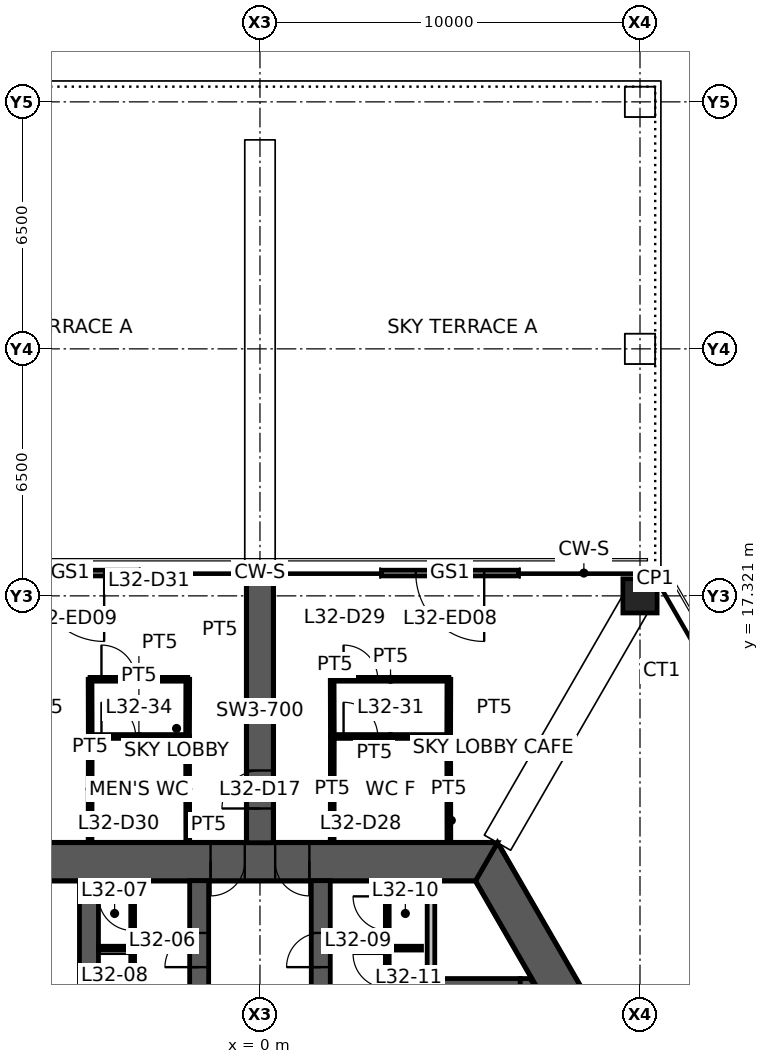
"""IFC4 building model, lengths in metres.
Left out: names, types, materials, properties, quantities, classifications, styles, units other than length and angle.
Written with IfcOpenShell. Run it as: python <this file> out.ifc"""

import sys

from ifc_helpers import new_model, si_unit, direction, frame, frame_2d, origin, origin_2d, place, context, subcontext, project, spatial, polyline, rectangle, hollow_rectangle, outline, extrude, element, fill, save


model = new_model("IFC4")
c1 = context("Model", 3, precision=1e-05, world=origin(), true_north=direction((0.0, 1.0)))
c2 = subcontext(c1, "Body", "Model", "MODEL_VIEW")
j1 = project(units=[si_unit("LENGTHUNIT", "METRE"), si_unit("PLANEANGLEUNIT", "RADIAN")], contexts=[c1])
p1 = place(None, origin())
s1 = spatial("IfcSite", under=j1, at=p1, CompositionType="ELEMENT")
p2 = place(p1, origin())
s2 = spatial("IfcBuilding", under=s1, at=p2, CompositionType="ELEMENT")
p3 = place(p2, frame((0.0, 0.0, 128.6)))
s3 = spatial("IfcBuildingStorey", under=s2, at=p3, CompositionType="ELEMENT", Elevation=128.6)
p4 = place(p3, frame((10.0, 17.321, 0.0), z_axis=(0.0, 0.0, 1.0), x_axis=(1.0, 0.0, 0.0)))
e1 = element("IfcColumn", 1, at=p4, inside=s3, PredefinedType="COLUMN", context=c2, shape_type="SweptSolid", body=[
    extrude(hollow_rectangle(XDim=0.9, YDim=0.9, WallThickness=0.07, at=origin_2d()), origin(), (0.0, 0.0, 1.0), 4.5),
])
p5 = place(p3, frame((11.922, 0.0, 0.0), z_axis=(0.0, 0.0, 1.0), x_axis=(-0.500004296715, 0.866022923061, 0.0)))
e2 = element("IfcWall", 2, at=p5, inside=s3, PredefinedType="SHEAR", context=c2, shape_type="SweptSolid", body=[
    extrude(outline(polyline([(-0.289, -0.5), (5.835, -0.5), (6.635, -0.5), (12.211, -0.5), (11.634, 0.5), (6.635, 0.5), (5.835, 0.5), (0.289, 0.5), (-0.289, -0.5)])), origin(), (0.0, 0.0, 1.0), 4.5),
])
p6 = place(p5, frame((5.835, 0.0, 0.0)))
e3 = element("IfcOpeningElement", 3, at=p6, cuts=e2, PredefinedType="OPENING", context=c2, shape_type="SweptSolid", body=[
    extrude(rectangle(XDim=0.8, YDim=2.1, at=frame_2d((0.4, 1.05))), frame((0.0, 0.51, 0.0), z_axis=(0.0, -1.0, 0.0), x_axis=(1.0, 0.0, 0.0)), (0.0, 0.0, 1.0), 1.02),
])
p7 = place(p3, frame((5.961, 10.325, 0.0), z_axis=(0.0, 0.0, 1.0), x_axis=(-1.0, 0.0, 0.0)))
e4 = element("IfcWall", 4, at=p7, inside=s3, PredefinedType="SHEAR", context=c2, shape_type="SweptSolid", body=[
    extrude(outline(polyline([(-0.289, -0.5), (4.661, -0.5), (5.561, -0.5), (6.361, -0.5), (7.261, -0.5), (12.211, -0.5), (11.634, 0.5), (7.261, 0.5), (6.361, 0.5), (5.561, 0.5), (4.661, 0.5), (0.289, 0.5), (-0.289, -0.5)])), origin(), (0.0, 0.0, 1.0), 4.5),
])
p8 = place(p7, frame((6.361, 0.0, 0.0)))
e5 = element("IfcOpeningElement", 5, at=p8, cuts=e4, PredefinedType="OPENING", context=c2, shape_type="SweptSolid", body=[
    extrude(rectangle(XDim=0.9, YDim=2.1, at=frame_2d((0.45, 1.05))), frame((0.0, 0.51, 0.0), z_axis=(0.0, -1.0, 0.0), x_axis=(1.0, 0.0, 0.0)), (0.0, 0.0, 1.0), 1.02),
])
p9 = place(p7, frame((4.661, 0.0, 0.0)))
e6 = element("IfcOpeningElement", 6, at=p9, cuts=e4, PredefinedType="OPENING", context=c2, shape_type="SweptSolid", body=[
    extrude(rectangle(XDim=0.9, YDim=2.1, at=frame_2d((0.45, 1.05))), frame((0.0, 0.51, 0.0), z_axis=(0.0, -1.0, 0.0), x_axis=(1.0, 0.0, 0.0)), (0.0, 0.0, 1.0), 1.02),
])
p10 = place(p3, frame((0.0, 10.825, 0.0), z_axis=(0.0, 0.0, 1.0), x_axis=(0.0, 1.0, 0.0)))
e7 = element("IfcWall", 7, at=p10, inside=s3, PredefinedType="SHEAR", context=c2, shape_type="SweptSolid", body=[
    extrude(rectangle(XDim=6.946, YDim=0.7, at=frame_2d((3.473, 0.0))), origin(), (0.0, 0.0, 1.0), 4.5),
])
p11 = place(p10, frame((0.9, 0.0, 0.0)))
e8 = element("IfcOpeningElement", 8, at=p11, cuts=e7, PredefinedType="OPENING", context=c2, shape_type="SweptSolid", body=[
    extrude(rectangle(XDim=1.0, YDim=2.1, at=frame_2d((0.5, 1.05))), frame((0.0, 0.36, 0.0), z_axis=(0.0, -1.0, 0.0), x_axis=(1.0, 0.0, 0.0)), (0.0, 0.0, 1.0), 0.72),
])
p12 = place(p3, frame((6.8, 17.92, 0.0), z_axis=(0.0, 0.0, 1.0), x_axis=(-1.0, 0.0, 0.0)))
e9 = element("IfcWall", 9, at=p12, inside=s3, PredefinedType="STANDARD", context=c2, shape_type="SweptSolid", body=[
    extrude(rectangle(XDim=3.6, YDim=0.15, at=frame_2d((1.8, 0.0))), origin(), (0.0, 0.0, 1.0), 4.5),
])
p13 = place(p12, frame((0.9, 0.0, 0.0)))
e10 = element("IfcOpeningElement", 10, at=p13, cuts=e9, PredefinedType="OPENING", context=c2, shape_type="SweptSolid", body=[
    extrude(rectangle(XDim=1.8, YDim=2.1, at=frame_2d((0.9, 1.05))), frame((0.0, 0.085, 0.0), z_axis=(0.0, -1.0, 0.0), x_axis=(1.0, 0.0, 0.0)), (0.0, 0.0, 1.0), 0.17),
])
p14 = place(p3, frame((-3.2, 17.92, 0.0), z_axis=(0.0, 0.0, 1.0), x_axis=(-1.0, 0.0, 0.0)))
e11 = element("IfcWall", 11, at=p14, inside=s3, PredefinedType="STANDARD", context=c2, shape_type="SweptSolid", body=[
    extrude(rectangle(XDim=3.6, YDim=0.15, at=frame_2d((1.8, 0.0))), origin(), (0.0, 0.0, 1.0), 4.5),
])
p15 = place(p14, frame((0.9, 0.0, 0.0)))
e12 = element("IfcOpeningElement", 12, at=p15, cuts=e11, PredefinedType="OPENING", context=c2, shape_type="SweptSolid", body=[
    extrude(rectangle(XDim=1.8, YDim=2.1, at=frame_2d((0.9, 1.05))), frame((0.0, 0.085, 0.0), z_axis=(0.0, -1.0, 0.0), x_axis=(1.0, 0.0, 0.0)), (0.0, 0.0, 1.0), 0.17),
])
p16 = place(p3, frame((-1.6, 3.85, 0.0), z_axis=(0.0, 0.0, 1.0), x_axis=(0.0, 1.0, 0.0)))
e13 = element("IfcWall", 13, at=p16, inside=s3, PredefinedType="SHEAR", context=c2, shape_type="SweptSolid", body=[
    extrude(rectangle(XDim=5.975, YDim=0.5, at=frame_2d((2.987, 0.0))), origin(), (0.0, 0.0, 1.0), 4.5),
])
p17 = place(p16, frame((3.7, 0.0, 0.0)))
e14 = element("IfcOpeningElement", 14, at=p17, cuts=e13, PredefinedType="OPENING", context=c2, shape_type="SweptSolid", body=[
    extrude(rectangle(XDim=0.9, YDim=2.1, at=frame_2d((0.45, 1.05))), frame((0.0, 0.26, 0.0), z_axis=(0.0, -1.0, 0.0), x_axis=(1.0, 0.0, 0.0)), (0.0, 0.0, 1.0), 0.52),
])
p18 = place(p3, frame((1.6, 3.85, 0.0), z_axis=(0.0, 0.0, 1.0), x_axis=(0.0, 1.0, 0.0)))
e15 = element("IfcWall", 15, at=p18, inside=s3, PredefinedType="SHEAR", context=c2, shape_type="SweptSolid", body=[
    extrude(rectangle(XDim=5.975, YDim=0.5, at=frame_2d((2.987, 0.0))), origin(), (0.0, 0.0, 1.0), 4.5),
])
p19 = place(p18, frame((3.7, 0.0, 0.0)))
e16 = element("IfcOpeningElement", 16, at=p19, cuts=e15, PredefinedType="OPENING", context=c2, shape_type="SweptSolid", body=[
    extrude(rectangle(XDim=0.9, YDim=2.1, at=frame_2d((0.45, 1.05))), frame((0.0, 0.26, 0.0), z_axis=(0.0, -1.0, 0.0), x_axis=(1.0, 0.0, 0.0)), (0.0, 0.0, 1.0), 0.52),
])
p20 = place(p3, frame((-4.5, 3.85, 0.0), z_axis=(0.0, 0.0, 1.0), x_axis=(0.0, 1.0, 0.0)))
e17 = element("IfcWall", 17, at=p20, inside=s3, PredefinedType="SHEAR", context=c2, shape_type="SweptSolid", body=[
    extrude(rectangle(XDim=5.975, YDim=0.5, at=frame_2d((2.987, 0.0))), origin(), (0.0, 0.0, 1.0), 4.5),
])
p21 = place(p3, frame((4.5, 3.85, 0.0), z_axis=(0.0, 0.0, 1.0), x_axis=(0.0, 1.0, 0.0)))
e18 = element("IfcWall", 18, at=p21, inside=s3, PredefinedType="SHEAR", context=c2, shape_type="SweptSolid", body=[
    extrude(rectangle(XDim=3.4, YDim=0.5, at=frame_2d((1.7, 0.0))), origin(), (0.0, 0.0, 1.0), 4.5),
])
p22 = place(p3, frame((4.75, 7.0, 0.0), z_axis=(0.0, 0.0, 1.0), x_axis=(1.0, 0.0, 0.0)))
e19 = element("IfcWall", 19, at=p22, inside=s3, PredefinedType="SHEAR", context=c2, shape_type="SweptSolid", body=[
    extrude(rectangle(XDim=2.1, YDim=0.5, at=frame_2d((1.05, 0.0))), origin(), (0.0, 0.0, 1.0), 4.5),
])
p23 = place(p3, frame((7.1, 3.85, 0.0), z_axis=(0.0, 0.0, 1.0), x_axis=(0.0, 1.0, 0.0)))
e20 = element("IfcWall", 20, at=p23, inside=s3, PredefinedType="SHEAR", context=c2, shape_type="SweptSolid", body=[
    extrude(outline(polyline([(0.0, -0.25), (3.069, -0.25), (3.4, 0.0), (3.4, 0.25), (0.0, 0.25), (0.0, -0.25)])), origin(), (0.0, 0.0, 1.0), 4.5),
])
p24 = place(p3, frame((4.5, 7.25, 0.0), z_axis=(0.0, 0.0, 1.0), x_axis=(0.0, 1.0, 0.0)))
e21 = element("IfcWall", 21, at=p24, inside=s3, PredefinedType="STANDARD", context=c2, shape_type="SweptSolid", body=[
    extrude(rectangle(XDim=2.575, YDim=0.2, at=frame_2d((1.288, 0.0))), origin(), (0.0, 0.0, 1.0), 4.5),
])
p25 = place(p3, frame((-3.35, 6.65, 0.0), z_axis=(0.0, 0.0, 1.0), x_axis=(0.0, 1.0, 0.0)))
e22 = element("IfcWall", 22, at=p25, inside=s3, PredefinedType="PARTITIONING", context=c2, shape_type="SweptSolid", body=[
    extrude(rectangle(XDim=3.175, YDim=0.1, at=frame_2d((1.587, 0.0))), origin(), (0.0, 0.0, 1.0), 3.55),
])
p26 = place(p25, frame((1.863, 0.0, 0.0)))
e23 = element("IfcOpeningElement", 23, at=p26, cuts=e22, PredefinedType="OPENING", context=c2, shape_type="SweptSolid", body=[
    extrude(rectangle(XDim=0.9, YDim=2.1, at=frame_2d((0.45, 1.05))), frame((0.0, 0.06, 0.0), z_axis=(0.0, -1.0, 0.0), x_axis=(1.0, 0.0, 0.0)), (0.0, 0.0, 1.0), 0.12),
])
p27 = place(p25, frame((0.35, 0.0, 0.0)))
e24 = element("IfcOpeningElement", 24, at=p27, cuts=e22, PredefinedType="OPENING", context=c2, shape_type="SweptSolid", body=[
    extrude(rectangle(XDim=0.9, YDim=2.1, at=frame_2d((0.45, 1.05))), frame((0.0, 0.06, 0.0), z_axis=(0.0, -1.0, 0.0), x_axis=(1.0, 0.0, 0.0)), (0.0, 0.0, 1.0), 0.12),
])
p28 = place(p3, frame((-3.4, 8.05, 0.0), z_axis=(0.0, 0.0, 1.0), x_axis=(-1.0, 0.0, 0.0)))
e25 = element("IfcWall", 25, at=p28, inside=s3, PredefinedType="PARTITIONING", context=c2, shape_type="SweptSolid", body=[
    extrude(rectangle(XDim=0.85, YDim=0.1, at=frame_2d((0.425, 0.0))), origin(), (0.0, 0.0, 1.0), 3.55),
])
p29 = place(p3, frame((3.35, 6.65, 0.0), z_axis=(0.0, 0.0, 1.0), x_axis=(0.0, 1.0, 0.0)))
e26 = element("IfcWall", 26, at=p29, inside=s3, PredefinedType="PARTITIONING", context=c2, shape_type="SweptSolid", body=[
    extrude(rectangle(XDim=3.175, YDim=0.1, at=frame_2d((1.587, 0.0))), origin(), (0.0, 0.0, 1.0), 3.55),
])
p30 = place(p29, frame((1.863, 0.0, 0.0)))
e27 = element("IfcOpeningElement", 27, at=p30, cuts=e26, PredefinedType="OPENING", context=c2, shape_type="SweptSolid", body=[
    extrude(rectangle(XDim=0.9, YDim=2.1, at=frame_2d((0.45, 1.05))), frame((0.0, 0.06, 0.0), z_axis=(0.0, -1.0, 0.0), x_axis=(1.0, 0.0, 0.0)), (0.0, 0.0, 1.0), 0.12),
])
p31 = place(p29, frame((0.35, 0.0, 0.0)))
e28 = element("IfcOpeningElement", 28, at=p31, cuts=e26, PredefinedType="OPENING", context=c2, shape_type="SweptSolid", body=[
    extrude(rectangle(XDim=0.9, YDim=2.1, at=frame_2d((0.45, 1.05))), frame((0.0, 0.06, 0.0), z_axis=(0.0, -1.0, 0.0), x_axis=(1.0, 0.0, 0.0)), (0.0, 0.0, 1.0), 0.12),
])
p32 = place(p3, frame((3.4, 8.05, 0.0), z_axis=(0.0, 0.0, 1.0), x_axis=(1.0, 0.0, 0.0)))
e29 = element("IfcWall", 29, at=p32, inside=s3, PredefinedType="PARTITIONING", context=c2, shape_type="SweptSolid", body=[
    extrude(rectangle(XDim=0.85, YDim=0.1, at=frame_2d((0.425, 0.0))), origin(), (0.0, 0.0, 1.0), 3.55),
])
p33 = place(p3, frame((1.9, 13.62, 0.0), z_axis=(0.0, 0.0, 1.0), x_axis=(1.0, 0.0, 0.0)))
e30 = element("IfcWall", 30, at=p33, inside=s3, PredefinedType="PARTITIONING", context=c2, shape_type="SweptSolid", body=[
    extrude(rectangle(XDim=3.071, YDim=0.1, at=frame_2d((1.536, 0.0))), origin(), (0.0, 0.0, 1.0), 3.55),
])
p34 = place(p33, frame((0.3, 0.0, 0.0)))
e31 = element("IfcOpeningElement", 31, at=p34, cuts=e30, PredefinedType="OPENING", context=c2, shape_type="SweptSolid", body=[
    extrude(rectangle(XDim=0.9, YDim=2.1, at=frame_2d((0.45, 1.05))), frame((0.0, 0.06, 0.0), z_axis=(0.0, -1.0, 0.0), x_axis=(1.0, 0.0, 0.0)), (0.0, 0.0, 1.0), 0.12),
])
for number, where, z_axis, x_axis in (
    (32, (1.9, 10.845, 0.0), (0.0, 0.0, 1.0), (0.002, 1.0, 0.0)),
    (33, (4.966, 13.625, 0.0), (0.0, 0.0, 1.0), (0.002, -1.0, 0.0)),
):
    element("IfcWall", number, at=place(p3, frame(where, z_axis=z_axis, x_axis=x_axis)), inside=s3, PredefinedType="PARTITIONING", context=c2, shape_type="SweptSolid", body=[
        extrude(rectangle(XDim=2.78, YDim=0.1, at=frame_2d((1.39, 0.0))), origin(), (0.0, 0.0, 1.0), 3.55),
    ])
p35 = place(p3, frame((1.9, 15.125, 0.0), z_axis=(0.0, 0.0, 1.0), x_axis=(1.0, 0.0, 0.0)))
e34 = element("IfcWall", 34, at=p35, inside=s3, PredefinedType="PARTITIONING", context=c2, shape_type="SweptSolid", body=[
    extrude(rectangle(XDim=3.071, YDim=0.1, at=frame_2d((1.536, 0.0))), origin(), (0.0, 0.0, 1.0), 3.55),
])
p36 = place(p35, frame((0.3, 0.0, 0.0)))
e35 = element("IfcOpeningElement", 35, at=p36, cuts=e34, PredefinedType="OPENING", context=c2, shape_type="SweptSolid", body=[
    extrude(rectangle(XDim=0.9, YDim=2.1, at=frame_2d((0.45, 1.05))), frame((0.0, 0.06, 0.0), z_axis=(0.0, -1.0, 0.0), x_axis=(1.0, 0.0, 0.0)), (0.0, 0.0, 1.0), 0.12),
])
for number, where, z_axis, x_axis in (
    (36, (1.905, 13.625, 0.0), (0.0, 0.0, 1.0), (-0.003, 1.0, 0.0)),
    (37, (4.971, 15.125, 0.0), (0.0, 0.0, 1.0), (-0.003, -1.0, 0.0)),
):
    element("IfcWall", number, at=place(p3, frame(where, z_axis=z_axis, x_axis=x_axis)), inside=s3, PredefinedType="PARTITIONING", context=c2, shape_type="SweptSolid", body=[
        extrude(rectangle(XDim=1.5, YDim=0.1, at=frame_2d((0.75, 0.0))), origin(), (0.0, 0.0, 1.0), 3.55),
    ])
p37 = place(p3, frame((-4.471, 13.62, 0.0), z_axis=(0.0, 0.0, 1.0), x_axis=(1.0, 0.0, 0.0)))
e38 = element("IfcWall", 38, at=p37, inside=s3, PredefinedType="PARTITIONING", context=c2, shape_type="SweptSolid", body=[
    extrude(rectangle(XDim=2.571, YDim=0.1, at=frame_2d((1.286, 0.0))), origin(), (0.0, 0.0, 1.0), 3.55),
])
p38 = place(p37, frame((0.3, 0.0, 0.0)))
e39 = element("IfcOpeningElement", 39, at=p38, cuts=e38, PredefinedType="OPENING", context=c2, shape_type="SweptSolid", body=[
    extrude(rectangle(XDim=0.9, YDim=2.1, at=frame_2d((0.45, 1.05))), frame((0.0, 0.06, 0.0), z_axis=(0.0, -1.0, 0.0), x_axis=(1.0, 0.0, 0.0)), (0.0, 0.0, 1.0), 0.12),
])
for number, where, z_axis, x_axis in (
    (40, (-4.471, 10.845, 0.0), (0.0, 0.0, 1.0), (0.002, 1.0, 0.0)),
    (41, (-1.905, 13.625, 0.0), (0.0, 0.0, 1.0), (0.002, -1.0, 0.0)),
):
    element("IfcWall", number, at=place(p3, frame(where, z_axis=z_axis, x_axis=x_axis)), inside=s3, PredefinedType="PARTITIONING", context=c2, shape_type="SweptSolid", body=[
        extrude(rectangle(XDim=2.78, YDim=0.1, at=frame_2d((1.39, 0.0))), origin(), (0.0, 0.0, 1.0), 3.55),
    ])
p39 = place(p3, frame((-4.471, 15.125, 0.0), z_axis=(0.0, 0.0, 1.0), x_axis=(1.0, 0.0, 0.0)))
e42 = element("IfcWall", 42, at=p39, inside=s3, PredefinedType="PARTITIONING", context=c2, shape_type="SweptSolid", body=[
    extrude(rectangle(XDim=2.571, YDim=0.1, at=frame_2d((1.286, 0.0))), origin(), (0.0, 0.0, 1.0), 3.55),
])
p40 = place(p39, frame((0.3, 0.0, 0.0)))
e43 = element("IfcOpeningElement", 43, at=p40, cuts=e42, PredefinedType="OPENING", context=c2, shape_type="SweptSolid", body=[
    extrude(rectangle(XDim=0.9, YDim=2.1, at=frame_2d((0.45, 1.05))), frame((0.0, 0.06, 0.0), z_axis=(0.0, -1.0, 0.0), x_axis=(1.0, 0.0, 0.0)), (0.0, 0.0, 1.0), 0.12),
])
for number, where, z_axis, x_axis in (
    (44, (-4.466, 13.625, 0.0), (0.0, 0.0, 1.0), (-0.003, 1.0, 0.0)),
    (45, (-1.9, 15.125, 0.0), (0.0, 0.0, 1.0), (-0.003, -1.0, 0.0)),
):
    element("IfcWall", number, at=place(p3, frame(where, z_axis=z_axis, x_axis=x_axis)), inside=s3, PredefinedType="PARTITIONING", context=c2, shape_type="SweptSolid", body=[
        extrude(rectangle(XDim=1.5, YDim=0.1, at=frame_2d((0.75, 0.0))), origin(), (0.0, 0.0, 1.0), 3.55),
    ])
p41 = place(p3, frame((0.0, 17.771, 0.0), z_axis=(0.0, 0.0, 1.0), x_axis=(0.0, 1.0, 0.0)))
e46 = element("IfcWall", 46, at=p41, inside=s3, PredefinedType="PARTITIONING", context=c2, shape_type="SweptSolid", body=[
    extrude(rectangle(XDim=0.045, YDim=0.175, at=frame_2d((0.022, 0.0))), origin(), (0.0, 0.0, 1.0), 4.5),
])
p42 = place(p13, origin())
e47 = element("IfcDoor", 47, at=p42, inside=s3, OperationType="DOUBLE_DOOR_SINGLE_SWING", PredefinedType="DOOR", context=c2, shape_type="SweptSolid", body=[
    extrude(rectangle(XDim=1.8, YDim=2.1, at=frame_2d((0.9, 1.05))), frame((0.0, 0.025, 0.0), z_axis=(0.0, -1.0, 0.0), x_axis=(1.0, 0.0, 0.0)), (0.0, 0.0, 1.0), 0.05),
])
fill(e10, e47)
p43 = place(p15, origin())
e48 = element("IfcDoor", 48, at=p43, inside=s3, OperationType="DOUBLE_DOOR_SINGLE_SWING", PredefinedType="DOOR", context=c2, shape_type="SweptSolid", body=[
    extrude(rectangle(XDim=1.8, YDim=2.1, at=frame_2d((0.9, 1.05))), frame((0.0, 0.025, 0.0), z_axis=(0.0, -1.0, 0.0), x_axis=(1.0, 0.0, 0.0)), (0.0, 0.0, 1.0), 0.05),
])
fill(e12, e48)
p44 = place(p8, origin())
e49 = element("IfcDoor", 49, at=p44, inside=s3, OperationType="SINGLE_SWING_RIGHT", PredefinedType="DOOR", context=c2, shape_type="SweptSolid", body=[
    extrude(rectangle(XDim=0.9, YDim=2.1, at=frame_2d((0.45, 1.05))), frame((0.0, 0.025, 0.0), z_axis=(0.0, -1.0, 0.0), x_axis=(1.0, 0.0, 0.0)), (0.0, 0.0, 1.0), 0.05),
])
fill(e5, e49)
p45 = place(p9, origin())
e50 = element("IfcDoor", 50, at=p45, inside=s3, OperationType="SINGLE_SWING_LEFT", PredefinedType="DOOR", context=c2, shape_type="SweptSolid", body=[
    extrude(rectangle(XDim=0.9, YDim=2.1, at=frame_2d((0.45, 1.05))), frame((0.0, 0.025, 0.0), z_axis=(0.0, -1.0, 0.0), x_axis=(1.0, 0.0, 0.0)), (0.0, 0.0, 1.0), 0.05),
])
fill(e6, e50)
p46 = place(p17, origin())
e51 = element("IfcDoor", 51, at=p46, inside=s3, OperationType="SINGLE_SWING_LEFT", PredefinedType="DOOR", context=c2, shape_type="SweptSolid", body=[
    extrude(rectangle(XDim=0.9, YDim=2.1, at=frame_2d((0.45, 1.05))), frame((0.0, 0.025, 0.0), z_axis=(0.0, -1.0, 0.0), x_axis=(1.0, 0.0, 0.0)), (0.0, 0.0, 1.0), 0.05),
])
fill(e14, e51)
p47 = place(p19, origin())
e52 = element("IfcDoor", 52, at=p47, inside=s3, OperationType="SINGLE_SWING_LEFT", PredefinedType="DOOR", context=c2, shape_type="SweptSolid", body=[
    extrude(rectangle(XDim=0.9, YDim=2.1, at=frame_2d((0.45, 1.05))), frame((0.0, 0.025, 0.0), z_axis=(0.0, -1.0, 0.0), x_axis=(1.0, 0.0, 0.0)), (0.0, 0.0, 1.0), 0.05),
])
fill(e16, e52)
p48 = place(p11, origin())
e53 = element("IfcDoor", 53, at=p48, inside=s3, OperationType="SINGLE_SWING_LEFT", PredefinedType="DOOR", context=c2, shape_type="SweptSolid", body=[
    extrude(rectangle(XDim=1.0, YDim=2.1, at=frame_2d((0.5, 1.05))), frame((0.0, 0.025, 0.0), z_axis=(0.0, -1.0, 0.0), x_axis=(1.0, 0.0, 0.0)), (0.0, 0.0, 1.0), 0.05),
])
fill(e8, e53)
p49 = place(p26, origin())
e54 = element("IfcDoor", 54, at=p49, inside=s3, OperationType="SINGLE_SWING_RIGHT", PredefinedType="DOOR", context=c2, shape_type="SweptSolid", body=[
    extrude(rectangle(XDim=0.9, YDim=2.1, at=frame_2d((0.45, 1.05))), frame((0.0, 0.025, 0.0), z_axis=(0.0, -1.0, 0.0), x_axis=(1.0, 0.0, 0.0)), (0.0, 0.0, 1.0), 0.05),
])
fill(e23, e54)
p50 = place(p27, origin())
e55 = element("IfcDoor", 55, at=p50, inside=s3, OperationType="SINGLE_SWING_RIGHT", PredefinedType="DOOR", context=c2, shape_type="SweptSolid", body=[
    extrude(rectangle(XDim=0.9, YDim=2.1, at=frame_2d((0.45, 1.05))), frame((0.0, 0.025, 0.0), z_axis=(0.0, -1.0, 0.0), x_axis=(1.0, 0.0, 0.0)), (0.0, 0.0, 1.0), 0.05),
])
fill(e24, e55)
p51 = place(p30, origin())
e56 = element("IfcDoor", 56, at=p51, inside=s3, OperationType="SINGLE_SWING_RIGHT", PredefinedType="DOOR", context=c2, shape_type="SweptSolid", body=[
    extrude(rectangle(XDim=0.9, YDim=2.1, at=frame_2d((0.45, 1.05))), frame((0.0, 0.025, 0.0), z_axis=(0.0, -1.0, 0.0), x_axis=(1.0, 0.0, 0.0)), (0.0, 0.0, 1.0), 0.05),
])
fill(e27, e56)
p52 = place(p31, origin())
e57 = element("IfcDoor", 57, at=p52, inside=s3, OperationType="SINGLE_SWING_RIGHT", PredefinedType="DOOR", context=c2, shape_type="SweptSolid", body=[
    extrude(rectangle(XDim=0.9, YDim=2.1, at=frame_2d((0.45, 1.05))), frame((0.0, 0.025, 0.0), z_axis=(0.0, -1.0, 0.0), x_axis=(1.0, 0.0, 0.0)), (0.0, 0.0, 1.0), 0.05),
])
fill(e28, e57)
p53 = place(p34, origin())
e58 = element("IfcDoor", 58, at=p53, inside=s3, OperationType="SINGLE_SWING_LEFT", PredefinedType="DOOR", context=c2, shape_type="SweptSolid", body=[
    extrude(rectangle(XDim=0.9, YDim=2.1, at=frame_2d((0.45, 1.05))), frame((0.0, 0.025, 0.0), z_axis=(0.0, -1.0, 0.0), x_axis=(1.0, 0.0, 0.0)), (0.0, 0.0, 1.0), 0.05),
])
fill(e31, e58)
p54 = place(p36, origin())
e59 = element("IfcDoor", 59, at=p54, inside=s3, OperationType="SINGLE_SWING_LEFT", PredefinedType="DOOR", context=c2, shape_type="SweptSolid", body=[
    extrude(rectangle(XDim=0.9, YDim=2.1, at=frame_2d((0.45, 1.05))), frame((0.0, 0.025, 0.0), z_axis=(0.0, -1.0, 0.0), x_axis=(1.0, 0.0, 0.0)), (0.0, 0.0, 1.0), 0.05),
])
fill(e35, e59)
p55 = place(p38, origin())
e60 = element("IfcDoor", 60, at=p55, inside=s3, OperationType="SINGLE_SWING_LEFT", PredefinedType="DOOR", context=c2, shape_type="SweptSolid", body=[
    extrude(rectangle(XDim=0.9, YDim=2.1, at=frame_2d((0.45, 1.05))), frame((0.0, 0.025, 0.0), z_axis=(0.0, -1.0, 0.0), x_axis=(1.0, 0.0, 0.0)), (0.0, 0.0, 1.0), 0.05),
])
fill(e39, e60)
p56 = place(p40, origin())
e61 = element("IfcDoor", 61, at=p56, inside=s3, OperationType="SINGLE_SWING_LEFT", PredefinedType="DOOR", context=c2, shape_type="SweptSolid", body=[
    extrude(rectangle(XDim=0.9, YDim=2.1, at=frame_2d((0.45, 1.05))), frame((0.0, 0.025, 0.0), z_axis=(0.0, -1.0, 0.0), x_axis=(1.0, 0.0, 0.0)), (0.0, 0.0, 1.0), 0.05),
])
fill(e43, e61)
save(model, sys.argv[1])
